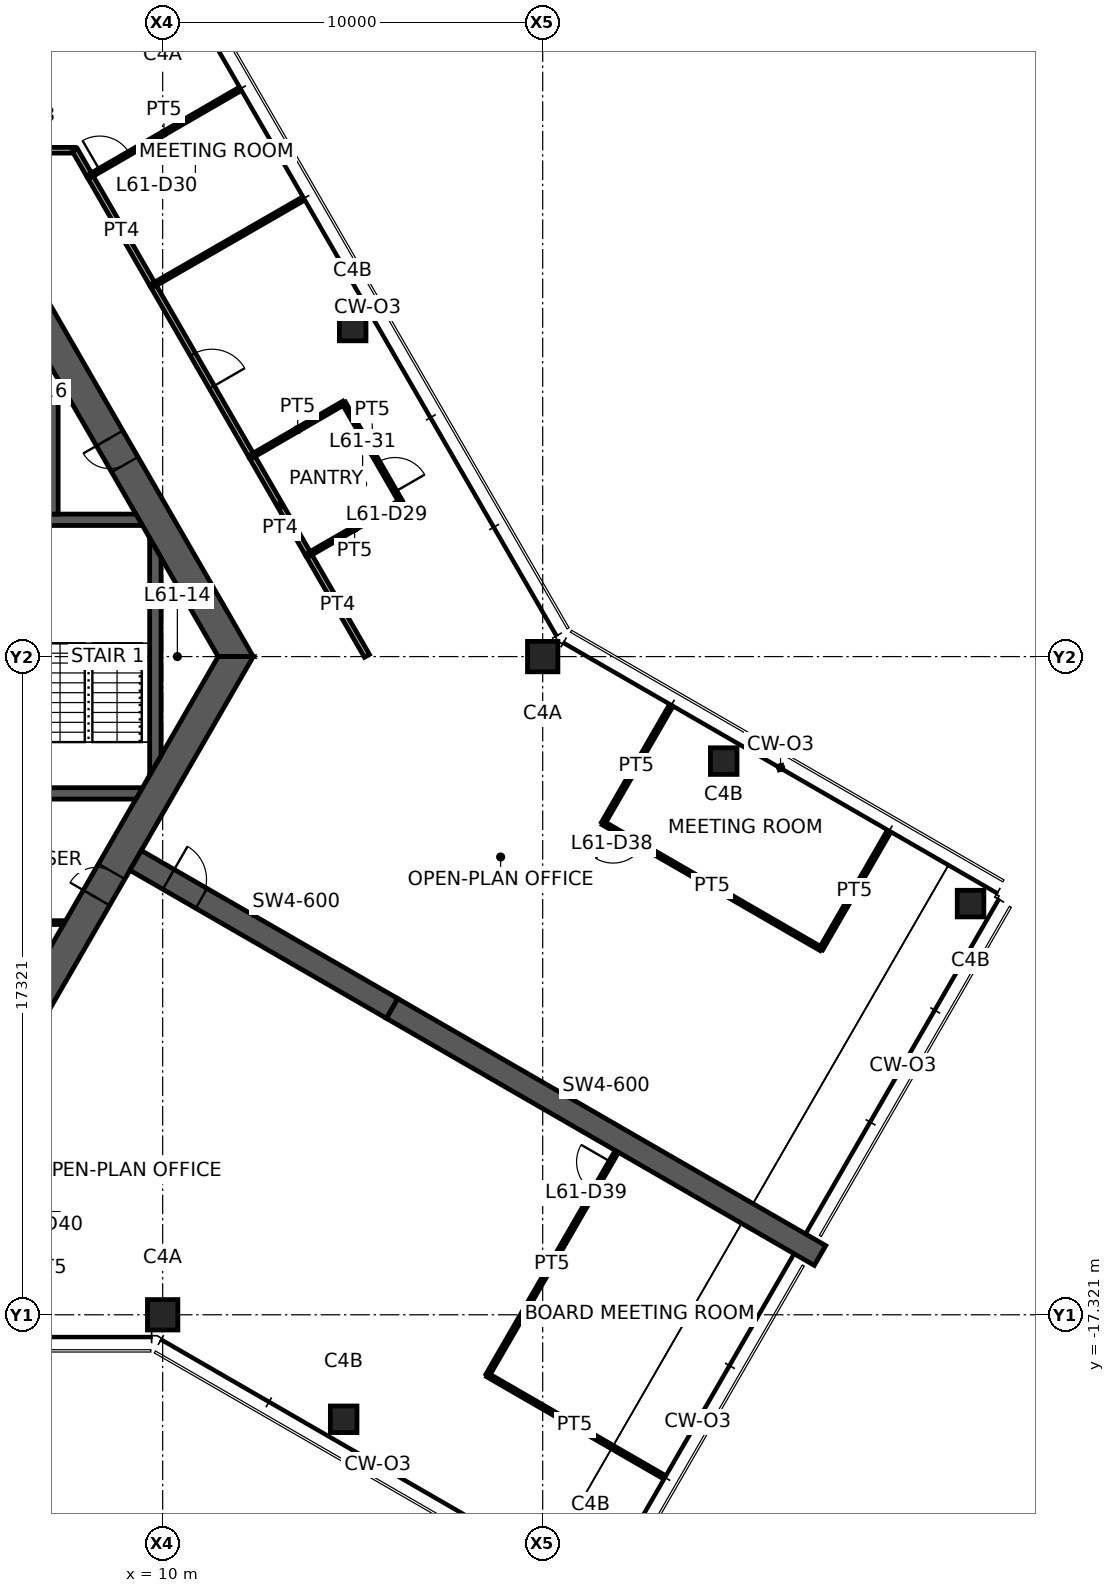
"""IFC4 building model, lengths in metres.
Left out: names, types, materials, properties, quantities, classifications, styles, units other than length and angle.
Written with IfcOpenShell. Run it as: python <this file> out.ifc"""

import sys

from ifc_helpers import new_model, si_unit, direction, frame, frame_2d, origin, origin_2d, place, context, subcontext, project, spatial, polyline, rectangle, hollow_rectangle, outline, extrude, element, fill, save


model = new_model("IFC4")
c1 = context("Model", 3, precision=1e-05, world=origin(), true_north=direction((0.0, 1.0)))
c2 = subcontext(c1, "Body", "Model", "MODEL_VIEW")
j1 = project(units=[si_unit("LENGTHUNIT", "METRE"), si_unit("PLANEANGLEUNIT", "RADIAN")], contexts=[c1])
p1 = place(None, origin())
s1 = spatial("IfcSite", under=j1, at=p1, CompositionType="ELEMENT")
p2 = place(p1, origin())
s2 = spatial("IfcBuilding", under=s1, at=p2, CompositionType="ELEMENT")
p3 = place(p2, frame((0.0, 0.0, 244.0)))
s3 = spatial("IfcBuildingStorey", under=s2, at=p3, CompositionType="ELEMENT", Elevation=244.0)
for number, where, z_axis, x_axis in (
    (1, (20.0, 0.0, 0.0), (0.0, 0.0, 1.0), (1.0, 0.0, 0.0)),
    (2, (10.0, -17.321, 0.0), (0.0, 0.0, 1.0), (1.0, 0.0, 0.0)),
):
    element("IfcColumn", number, at=place(p3, frame(where, z_axis=z_axis, x_axis=x_axis)), inside=s3, PredefinedType="COLUMN", context=c2, shape_type="SweptSolid", body=[
        extrude(hollow_rectangle(XDim=0.8, YDim=0.8, WallThickness=0.04, at=origin_2d()), origin(), (0.0, 0.0, 1.0), 3.9),
    ])
for number, where, z_axis, x_axis in (
    (3, (15.0, 8.66, 0.0), (0.0, 0.0, 1.0), (1.0, 0.0, 0.0)),
    (4, (14.763, -20.071, 0.0), (0.0, 0.0, 1.0), (1.0, 0.0, 0.0)),
    (5, (24.763, -2.75, 0.0), (0.0, 0.0, 1.0), (1.0, 0.0, 0.0)),
    (6, (31.258, -6.5, 0.0), (0.0, 0.0, 1.0), (1.0, 0.0, 0.0)),
):
    element("IfcColumn", number, at=place(p3, frame(where, z_axis=z_axis, x_axis=x_axis)), inside=s3, PredefinedType="COLUMN", context=c2, shape_type="SweptSolid", body=[
        extrude(hollow_rectangle(XDim=0.7, YDim=0.7, WallThickness=0.032, at=origin_2d()), origin(), (0.0, 0.0, 1.0), 3.9),
    ])
p4 = place(p3, frame((11.922, 0.0, 0.0), z_axis=(0.0, 0.0, 1.0), x_axis=(-0.500004296715, 0.866022923061, 0.0)))
e7 = element("IfcWall", 7, at=p4, inside=s3, PredefinedType="SHEAR", context=c2, shape_type="SweptSolid", body=[
    extrude(outline(polyline([(-0.231, -0.4), (5.835, -0.4), (6.635, -0.4), (12.153, -0.4), (11.691, 0.4), (6.635, 0.4), (5.835, 0.4), (0.231, 0.4), (-0.231, -0.4)])), origin(), (0.0, 0.0, 1.0), 3.9),
])
p5 = place(p4, frame((5.835, 0.0, 0.0)))
e8 = element("IfcOpeningElement", 8, at=p5, cuts=e7, PredefinedType="OPENING", context=c2, shape_type="SweptSolid", body=[
    extrude(rectangle(XDim=0.8, YDim=2.1, at=frame_2d((0.4, 1.05))), frame((0.0, 0.41, 0.0), z_axis=(0.0, -1.0, 0.0), x_axis=(1.0, 0.0, 0.0)), (0.0, 0.0, 1.0), 0.82),
])
p6 = place(p3, frame((5.961, -10.325, 0.0), z_axis=(0.0, 0.0, 1.0), x_axis=(0.500004296715, 0.866022923061, 0.0)))
e9 = element("IfcWall", 9, at=p6, inside=s3, PredefinedType="SHEAR", context=c2, shape_type="SweptSolid", body=[
    extrude(outline(polyline([(-0.231, -0.4), (4.594, -0.4), (5.394, -0.4), (12.153, -0.4), (11.691, 0.4), (5.394, 0.4), (4.594, 0.4), (0.231, 0.4), (-0.231, -0.4)])), origin(), (0.0, 0.0, 1.0), 3.9),
])
p7 = place(p6, frame((4.594, 0.0, 0.0)))
e10 = element("IfcOpeningElement", 10, at=p7, cuts=e9, PredefinedType="OPENING", context=c2, shape_type="SweptSolid", body=[
    extrude(rectangle(XDim=0.8, YDim=2.1, at=frame_2d((0.4, 1.05))), frame((0.0, 0.41, 0.0), z_axis=(0.0, -1.0, 0.0), x_axis=(1.0, 0.0, 0.0)), (0.0, 0.0, 1.0), 0.82),
])
p8 = place(p3, frame((9.288, -5.363, 0.0), z_axis=(0.0, 0.0, 1.0), x_axis=(0.866031736626, -0.499989031036, 0.0)))
e11 = element("IfcWall", 11, at=p8, inside=s3, PredefinedType="SHEAR", context=c2, shape_type="SweptSolid", body=[
    extrude(rectangle(XDim=7.796, YDim=0.6, at=frame_2d((3.898, 0.0))), origin(), (0.0, 0.0, 1.0), 3.9),
])
p9 = place(p8, frame((1.0, 0.0, 0.0)))
e12 = element("IfcOpeningElement", 12, at=p9, cuts=e11, PredefinedType="OPENING", context=c2, shape_type="SweptSolid", body=[
    extrude(rectangle(XDim=1.0, YDim=2.1, at=frame_2d((0.5, 1.05))), frame((0.0, 0.31, 0.0), z_axis=(0.0, -1.0, 0.0), x_axis=(1.0, 0.0, 0.0)), (0.0, 0.0, 1.0), 0.62),
])
p10 = place(p3, frame((16.039, -9.26, 0.0), z_axis=(0.0, 0.0, 1.0), x_axis=(0.866024837091, -0.50000098154, 0.0)))
e13 = element("IfcWall", 13, at=p10, inside=s3, PredefinedType="SHEAR", context=c2, shape_type="SweptSolid", body=[
    extrude(rectangle(XDim=13.0, YDim=0.6, at=frame_2d((6.5, 0.0))), origin(), (0.0, 0.0, 1.0), 3.9),
])
p11 = place(p3, frame((1.45, 3.6, 0.0), z_axis=(0.0, 0.0, 1.0), x_axis=(1.0, 0.0, 0.0)))
e14 = element("IfcWall", 14, at=p11, inside=s3, PredefinedType="SHEAR", context=c2, shape_type="SweptSolid", body=[
    extrude(outline(polyline([(0.0, -0.15), (1.15, -0.15), (2.05, -0.15), (3.4, -0.15), (4.7, -0.15), (8.019, -0.15), (7.845, 0.15), (4.7, 0.15), (3.4, 0.15), (2.05, 0.15), (1.15, 0.15), (0.0, 0.15), (0.0, -0.15)])), origin(), (0.0, 0.0, 1.0), 3.9),
])
p12 = place(p11, frame((1.15, 0.0, 0.0)))
e15 = element("IfcOpeningElement", 15, at=p12, cuts=e14, PredefinedType="OPENING", context=c2, shape_type="SweptSolid", body=[
    extrude(rectangle(XDim=0.9, YDim=2.1, at=frame_2d((0.45, 1.05))), frame((0.0, 0.16, 0.0), z_axis=(0.0, -1.0, 0.0), x_axis=(1.0, 0.0, 0.0)), (0.0, 0.0, 1.0), 0.32),
])
p13 = place(p11, frame((3.4, 0.0, 0.0)))
e16 = element("IfcOpeningElement", 16, at=p13, cuts=e14, PredefinedType="OPENING", context=c2, shape_type="SweptSolid", body=[
    extrude(rectangle(XDim=1.3, YDim=2.1, at=frame_2d((0.65, 1.05))), frame((0.0, 0.16, 0.0), z_axis=(0.0, -1.0, 0.0), x_axis=(1.0, 0.0, 0.0)), (0.0, 0.0, 1.0), 0.32),
])
p14 = place(p3, frame((1.45, -3.6, 0.0), z_axis=(0.0, 0.0, 1.0), x_axis=(1.0, 0.0, 0.0)))
e17 = element("IfcWall", 17, at=p14, inside=s3, PredefinedType="SHEAR", context=c2, shape_type="SweptSolid", body=[
    extrude(outline(polyline([(0.0, -0.15), (1.05, -0.15), (2.15, -0.15), (7.845, -0.15), (8.019, 0.15), (2.15, 0.15), (1.05, 0.15), (0.0, 0.15), (0.0, -0.15)])), origin(), (0.0, 0.0, 1.0), 3.9),
])
p15 = place(p14, frame((1.05, 0.0, 0.0)))
e18 = element("IfcOpeningElement", 18, at=p15, cuts=e17, PredefinedType="OPENING", context=c2, shape_type="SweptSolid", body=[
    extrude(rectangle(XDim=1.1, YDim=2.1, at=frame_2d((0.55, 1.05))), frame((0.0, 0.16, 0.0), z_axis=(0.0, -1.0, 0.0), x_axis=(1.0, 0.0, 0.0)), (0.0, 0.0, 1.0), 0.32),
])
p16 = place(p3, frame((4.65, 7.0, 0.0), z_axis=(0.0, 0.0, 1.0), x_axis=(1.0, 0.0, 0.0)))
e19 = element("IfcWall", 19, at=p16, inside=s3, PredefinedType="SHEAR", context=c2, shape_type="SweptSolid", body=[
    extrude(rectangle(XDim=2.6, YDim=0.3, at=frame_2d((1.3, 0.0))), origin(), (0.0, 0.0, 1.0), 3.9),
])
p17 = place(p3, frame((7.1, 3.75, 0.0), z_axis=(0.0, 0.0, 1.0), x_axis=(0.0, 1.0, 0.0)))
e20 = element("IfcWall", 20, at=p17, inside=s3, PredefinedType="SHEAR", context=c2, shape_type="SweptSolid", body=[
    extrude(rectangle(XDim=3.1, YDim=0.3, at=frame_2d((1.55, 0.0))), origin(), (0.0, 0.0, 1.0), 3.9),
])
p18 = place(p3, frame((9.808, -2.862, 0.0), z_axis=(0.0, 0.0, 1.0), x_axis=(0.0, 1.0, 0.0)))
e21 = element("IfcWall", 21, at=p18, inside=s3, PredefinedType="SHEAR", context=c2, shape_type="SweptSolid", body=[
    extrude(outline(polyline([(0.26, -0.15), (5.465, -0.15), (5.984, 0.15), (-0.26, 0.15), (0.26, -0.15)])), origin(), (0.0, 0.0, 1.0), 3.9),
])
p19 = place(p3, frame((4.65, -7.0, 0.0), z_axis=(0.0, 0.0, 1.0), x_axis=(1.0, 0.0, 0.0)))
e22 = element("IfcWall", 22, at=p19, inside=s3, PredefinedType="PARTITIONING", context=c2, shape_type="SweptSolid", body=[
    extrude(outline(polyline([(0.0, -0.05), (0.35, -0.05), (1.15, -0.05), (2.74, -0.05), (2.769, 0.0), (2.775, 0.05), (1.15, 0.05), (0.35, 0.05), (0.0, 0.05), (0.0, -0.05)])), origin(), (0.0, 0.0, 1.0), 2.95),
])
p20 = place(p19, frame((0.35, 0.0, 0.0)))
e23 = element("IfcOpeningElement", 23, at=p20, cuts=e22, PredefinedType="OPENING", context=c2, shape_type="SweptSolid", body=[
    extrude(rectangle(XDim=0.8, YDim=2.1, at=frame_2d((0.4, 1.05))), frame((0.0, 0.06, 0.0), z_axis=(0.0, -1.0, 0.0), x_axis=(1.0, 0.0, 0.0)), (0.0, 0.0, 1.0), 0.12),
])
p21 = place(p3, frame((12.337, 5.281, 0.0), z_axis=(0.0, 0.0, 1.0), x_axis=(0.499977562641, -0.866038357612, 0.0)))
e24 = element("IfcWall", 24, at=p21, inside=s3, PredefinedType="PARTITIONING", context=c2, shape_type="SweptSolid", body=[
    extrude(rectangle(XDim=3.01, YDim=0.15, at=frame_2d((1.505, 0.0))), origin(), (0.0, 0.0, 1.0), 2.95),
])
p22 = place(p3, frame((8.08, 12.656, 0.0), z_axis=(0.0, 0.0, 1.0), x_axis=(0.499990242038, -0.866031037473, 0.0)))
e25 = element("IfcWall", 25, at=p22, inside=s3, PredefinedType="PARTITIONING", context=c2, shape_type="SweptSolid", body=[
    extrude(rectangle(XDim=3.341, YDim=0.15, at=frame_2d((1.67, 0.0))), origin(), (0.0, 0.0, 1.0), 2.95),
])
p23 = place(p3, frame((9.745, 9.771, 0.0), z_axis=(0.0, 0.0, 1.0), x_axis=(0.499981525251, -0.866036069923, 0.0)))
e26 = element("IfcWall", 26, at=p23, inside=s3, PredefinedType="PARTITIONING", context=c2, shape_type="SweptSolid", body=[
    extrude(rectangle(XDim=5.194, YDim=0.15, at=frame_2d((2.597, 0.0))), origin(), (0.0, 0.0, 1.0), 2.95),
])
p24 = place(p23, frame((2.097, 0.0, 0.0)))
e27 = element("IfcOpeningElement", 27, at=p24, cuts=e26, PredefinedType="OPENING", context=c2, shape_type="SweptSolid", body=[
    extrude(rectangle(XDim=1.0, YDim=2.1, at=frame_2d((0.5, 1.05))), frame((0.0, 0.085, 0.0), z_axis=(0.0, -1.0, 0.0), x_axis=(1.0, 0.0, 0.0)), (0.0, 0.0, 1.0), 0.17),
])
p25 = place(p3, frame((13.838, 2.683, 0.0), z_axis=(0.0, 0.0, 1.0), x_axis=(0.499965335005, -0.866045416704, 0.0)))
e28 = element("IfcWall", 28, at=p25, inside=s3, PredefinedType="PARTITIONING", context=c2, shape_type="SweptSolid", body=[
    extrude(rectangle(XDim=3.074, YDim=0.15, at=frame_2d((1.537, 0.0))), origin(), (0.0, 0.0, 1.0), 2.95),
])
p26 = place(p3, frame((4.46, 13.325, 0.0), z_axis=(0.0, 0.0, 1.0), x_axis=(1.0, 0.0, 0.0)))
e29 = element("IfcWall", 29, at=p26, inside=s3, PredefinedType="PARTITIONING", context=c2, shape_type="SweptSolid", body=[
    extrude(rectangle(XDim=3.233, YDim=0.15, at=frame_2d((1.616, 0.0))), origin(), (0.0, 0.0, 1.0), 2.95),
])
p27 = place(p26, frame((1.116, 0.0, 0.0)))
e30 = element("IfcOpeningElement", 30, at=p27, cuts=e29, PredefinedType="OPENING", context=c2, shape_type="SweptSolid", body=[
    extrude(rectangle(XDim=1.0, YDim=2.1, at=frame_2d((0.5, 1.05))), frame((0.0, 0.085, 0.0), z_axis=(0.0, -1.0, 0.0), x_axis=(1.0, 0.0, 0.0)), (0.0, 0.0, 1.0), 0.17),
])
p28 = place(p3, frame((7.693, 13.325, 0.0), z_axis=(0.0, 0.0, 1.0), x_axis=(0.50010075504, -0.86596722502, 0.0)))
e31 = element("IfcWall", 31, at=p28, inside=s3, PredefinedType="PARTITIONING", context=c2, shape_type="SweptSolid", body=[
    extrude(rectangle(XDim=0.782, YDim=0.15, at=frame_2d((0.391, 0.0))), origin(), (0.0, 0.0, 1.0), 2.95),
])
p29 = place(p3, frame((12.342, 5.273, 0.0), z_axis=(0.0, 0.0, 1.0), x_axis=(0.865195372903, 0.501434907746, 0.0)))
e32 = element("IfcWall", 32, at=p29, inside=s3, PredefinedType="PARTITIONING", context=c2, shape_type="SweptSolid", body=[
    extrude(rectangle(XDim=2.8, YDim=0.1, at=frame_2d((1.4, 0.0))), origin(), (0.0, 0.0, 1.0), 2.95),
])
p30 = place(p3, frame((14.765, 6.677, 0.0), z_axis=(0.0, 0.0, 1.0), x_axis=(0.499990139034, -0.866031096941, 0.0)))
e33 = element("IfcWall", 33, at=p30, inside=s3, PredefinedType="PARTITIONING", context=c2, shape_type="SweptSolid", body=[
    extrude(rectangle(XDim=3.0, YDim=0.1, at=frame_2d((1.5, 0.0))), origin(), (0.0, 0.0, 1.0), 2.95),
])
p31 = place(p30, frame((1.8, 0.0, 0.0)))
e34 = element("IfcOpeningElement", 34, at=p31, cuts=e33, PredefinedType="OPENING", context=c2, shape_type="SweptSolid", body=[
    extrude(rectangle(XDim=0.9, YDim=2.1, at=frame_2d((0.45, 1.05))), frame((0.0, 0.06, 0.0), z_axis=(0.0, -1.0, 0.0), x_axis=(1.0, 0.0, 0.0)), (0.0, 0.0, 1.0), 0.12),
])
p32 = place(p3, frame((16.265, 4.079, 0.0), z_axis=(0.0, 0.0, 1.0), x_axis=(-0.86679607088, -0.498662783358, 0.0)))
e35 = element("IfcWall", 35, at=p32, inside=s3, PredefinedType="PARTITIONING", context=c2, shape_type="SweptSolid", body=[
    extrude(rectangle(XDim=2.8, YDim=0.1, at=frame_2d((1.4, 0.0))), origin(), (0.0, 0.0, 1.0), 2.95),
])
p33 = place(p3, frame((13.623, 12.004, 0.0), z_axis=(0.0, 0.0, 1.0), x_axis=(-0.866535947524, -0.499114667835, 0.0)))
e36 = element("IfcWall", 36, at=p33, inside=s3, PredefinedType="PARTITIONING", context=c2, shape_type="SweptSolid", body=[
    extrude(rectangle(XDim=4.475, YDim=0.1, at=frame_2d((2.238, 0.0))), origin(), (0.0, 0.0, 1.0), 2.95),
])
p34 = place(p3, frame((8.084, 12.648, 0.0), z_axis=(0.0, 0.0, 1.0), x_axis=(0.865532616855, 0.500852562298, 0.0)))
e37 = element("IfcWall", 37, at=p34, inside=s3, PredefinedType="PARTITIONING", context=c2, shape_type="SweptSolid", body=[
    extrude(rectangle(XDim=4.506, YDim=0.1, at=frame_2d((2.253, 0.0))), origin(), (0.0, 0.0, 1.0), 2.95),
])
p35 = place(p34, frame((0.3, 0.0, 0.0)))
e38 = element("IfcOpeningElement", 38, at=p35, cuts=e37, PredefinedType="OPENING", context=c2, shape_type="SweptSolid", body=[
    extrude(rectangle(XDim=0.9, YDim=2.1, at=frame_2d((0.45, 1.05))), frame((0.0, 0.06, 0.0), z_axis=(0.0, -1.0, 0.0), x_axis=(1.0, 0.0, 0.0)), (0.0, 0.0, 1.0), 0.12),
])
p36 = place(p3, frame((21.592, -4.383, 0.0), z_axis=(0.0, 0.0, 1.0), x_axis=(0.500009906705, 0.86601968407, 0.0)))
e39 = element("IfcWall", 39, at=p36, inside=s3, PredefinedType="PARTITIONING", context=c2, shape_type="SweptSolid", body=[
    extrude(rectangle(XDim=3.48, YDim=0.1, at=frame_2d((1.74, 0.0))), origin(), (0.0, 0.0, 1.0), 2.95),
])
p37 = place(p3, frame((27.325, -7.693, 0.0), z_axis=(0.0, 0.0, 1.0), x_axis=(-0.866021597574, 0.500006592492, 0.0)))
e40 = element("IfcWall", 40, at=p37, inside=s3, PredefinedType="PARTITIONING", context=c2, shape_type="SweptSolid", body=[
    extrude(rectangle(XDim=6.62, YDim=0.1, at=frame_2d((3.31, 0.0))), origin(), (0.0, 0.0, 1.0), 2.95),
])
p38 = place(p37, frame((5.42, 0.0, 0.0)))
e41 = element("IfcOpeningElement", 41, at=p38, cuts=e40, PredefinedType="OPENING", context=c2, shape_type="SweptSolid", body=[
    extrude(rectangle(XDim=0.9, YDim=2.1, at=frame_2d((0.45, 1.05))), frame((0.0, 0.06, 0.0), z_axis=(0.0, -1.0, 0.0), x_axis=(1.0, 0.0, 0.0)), (0.0, 0.0, 1.0), 0.12),
])
p39 = place(p3, frame((29.08, -4.653, 0.0), z_axis=(0.0, 0.0, 1.0), x_axis=(-0.500021481416, -0.866013001128, 0.0)))
e42 = element("IfcWall", 42, at=p39, inside=s3, PredefinedType="PARTITIONING", context=c2, shape_type="SweptSolid", body=[
    extrude(rectangle(XDim=3.51, YDim=0.1, at=frame_2d((1.755, 0.0))), origin(), (0.0, 0.0, 1.0), 2.95),
])
p40 = place(p3, frame((18.552, -18.909, 0.0), z_axis=(0.0, 0.0, 1.0), x_axis=(0.499992600721, 0.866029675718, 0.0)))
e43 = element("IfcWall", 43, at=p40, inside=s3, PredefinedType="PARTITIONING", context=c2, shape_type="SweptSolid", body=[
    extrude(rectangle(XDim=6.78, YDim=0.1, at=frame_2d((3.39, 0.0))), origin(), (0.0, 0.0, 1.0), 2.95),
])
p41 = place(p40, frame((5.58, 0.0, 0.0)))
e44 = element("IfcOpeningElement", 44, at=p41, cuts=e43, PredefinedType="OPENING", context=c2, shape_type="SweptSolid", body=[
    extrude(rectangle(XDim=0.9, YDim=2.1, at=frame_2d((0.45, 1.05))), frame((0.0, 0.06, 0.0), z_axis=(0.0, -1.0, 0.0), x_axis=(1.0, 0.0, 0.0)), (0.0, 0.0, 1.0), 0.12),
])
p42 = place(p3, frame((23.124, -21.549, 0.0), z_axis=(0.0, 0.0, 1.0), x_axis=(-0.866009249374, 0.500027979216, 0.0)))
e45 = element("IfcWall", 45, at=p42, inside=s3, PredefinedType="PARTITIONING", context=c2, shape_type="SweptSolid", body=[
    extrude(rectangle(XDim=5.28, YDim=0.1, at=frame_2d((2.64, 0.0))), origin(), (0.0, 0.0, 1.0), 2.95),
])
p43 = place(p5, origin())
e46 = element("IfcDoor", 46, at=p43, inside=s3, OperationType="SINGLE_SWING_RIGHT", PredefinedType="DOOR", context=c2, shape_type="SweptSolid", body=[
    extrude(rectangle(XDim=0.8, YDim=2.1, at=frame_2d((0.4, 1.05))), frame((0.0, 0.025, 0.0), z_axis=(0.0, -1.0, 0.0), x_axis=(1.0, 0.0, 0.0)), (0.0, 0.0, 1.0), 0.05),
])
fill(e8, e46)
p44 = place(p7, origin())
e47 = element("IfcDoor", 47, at=p44, inside=s3, OperationType="SINGLE_SWING_LEFT", PredefinedType="DOOR", context=c2, shape_type="SweptSolid", body=[
    extrude(rectangle(XDim=0.8, YDim=2.1, at=frame_2d((0.4, 1.05))), frame((0.0, 0.025, 0.0), z_axis=(0.0, -1.0, 0.0), x_axis=(1.0, 0.0, 0.0)), (0.0, 0.0, 1.0), 0.05),
])
fill(e10, e47)
p45 = place(p9, origin())
e48 = element("IfcDoor", 48, at=p45, inside=s3, OperationType="SINGLE_SWING_LEFT", PredefinedType="DOOR", context=c2, shape_type="SweptSolid", body=[
    extrude(rectangle(XDim=1.0, YDim=2.1, at=frame_2d((0.5, 1.05))), frame((0.0, 0.025, 0.0), z_axis=(0.0, -1.0, 0.0), x_axis=(1.0, 0.0, 0.0)), (0.0, 0.0, 1.0), 0.05),
])
fill(e12, e48)
p46 = place(p24, origin())
e49 = element("IfcDoor", 49, at=p46, inside=s3, OperationType="SINGLE_SWING_RIGHT", PredefinedType="DOOR", context=c2, shape_type="SweptSolid", body=[
    extrude(rectangle(XDim=1.0, YDim=2.1, at=frame_2d((0.5, 1.05))), frame((0.0, 0.025, 0.0), z_axis=(0.0, -1.0, 0.0), x_axis=(1.0, 0.0, 0.0)), (0.0, 0.0, 1.0), 0.05),
])
fill(e27, e49)
p47 = place(p31, origin())
e50 = element("IfcDoor", 50, at=p47, inside=s3, OperationType="SINGLE_SWING_RIGHT", PredefinedType="DOOR", context=c2, shape_type="SweptSolid", body=[
    extrude(rectangle(XDim=0.9, YDim=2.1, at=frame_2d((0.45, 1.05))), frame((0.0, 0.025, 0.0), z_axis=(0.0, -1.0, 0.0), x_axis=(1.0, 0.0, 0.0)), (0.0, 0.0, 1.0), 0.05),
])
fill(e34, e50)
p48 = place(p35, origin())
e51 = element("IfcDoor", 51, at=p48, inside=s3, OperationType="SINGLE_SWING_LEFT", PredefinedType="DOOR", context=c2, shape_type="SweptSolid", body=[
    extrude(rectangle(XDim=0.9, YDim=2.1, at=frame_2d((0.45, 1.05))), frame((0.0, 0.025, 0.0), z_axis=(0.0, -1.0, 0.0), x_axis=(1.0, 0.0, 0.0)), (0.0, 0.0, 1.0), 0.05),
])
fill(e38, e51)
p49 = place(p38, origin())
e52 = element("IfcDoor", 52, at=p49, inside=s3, OperationType="SINGLE_SWING_RIGHT", PredefinedType="DOOR", context=c2, shape_type="SweptSolid", body=[
    extrude(rectangle(XDim=0.9, YDim=2.1, at=frame_2d((0.45, 1.05))), frame((0.0, 0.025, 0.0), z_axis=(0.0, -1.0, 0.0), x_axis=(1.0, 0.0, 0.0)), (0.0, 0.0, 1.0), 0.05),
])
fill(e41, e52)
p50 = place(p41, origin())
e53 = element("IfcDoor", 53, at=p50, inside=s3, OperationType="SINGLE_SWING_RIGHT", PredefinedType="DOOR", context=c2, shape_type="SweptSolid", body=[
    extrude(rectangle(XDim=0.9, YDim=2.1, at=frame_2d((0.45, 1.05))), frame((0.0, 0.025, 0.0), z_axis=(0.0, -1.0, 0.0), x_axis=(1.0, 0.0, 0.0)), (0.0, 0.0, 1.0), 0.05),
])
fill(e44, e53)
save(model, sys.argv[1])
